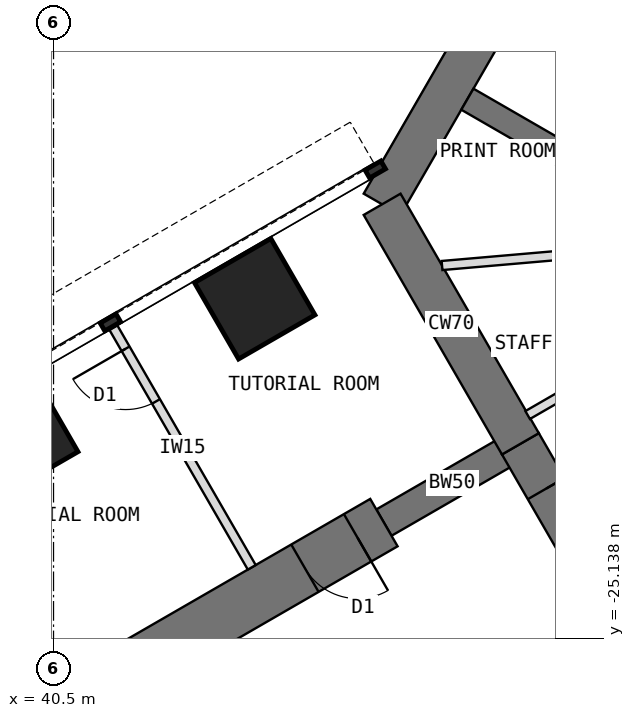
"""IFC4 building model, lengths in metres.
Left out: names, types, materials, properties, quantities, classifications, styles, units other than length and angle.
Written with IfcOpenShell. Run it as: python <this file> out.ifc"""

import sys

from ifc_helpers import new_model, si_unit, direction, frame, frame_2d, origin, origin_2d, place, context, subcontext, project, spatial, rectangle, extrude, element, fill, save


model = new_model("IFC4")
c1 = context("Model", 3, precision=1e-05, world=origin(), true_north=direction((0.0, 1.0)))
c2 = subcontext(c1, "Body", "Model", "MODEL_VIEW")
j1 = project(units=[si_unit("LENGTHUNIT", "METRE"), si_unit("PLANEANGLEUNIT", "RADIAN")], contexts=[c1])
p1 = place(None, origin())
s1 = spatial("IfcSite", under=j1, at=p1, CompositionType="ELEMENT")
p2 = place(p1, origin())
s2 = spatial("IfcBuilding", under=s1, at=p2, CompositionType="ELEMENT")
p3 = place(p2, frame((0.0, 0.0, 64.5)))
s3 = spatial("IfcBuildingStorey", under=s2, at=p3, CompositionType="ELEMENT", Elevation=64.5)
p4 = place(p3, frame((52.202, -7.092, 0.0), z_axis=(0.0, 0.0, 1.0), x_axis=(-0.500005998175, -0.866021940709, 0.0)))
e1 = element("IfcWall", 1, at=p4, inside=s3, PredefinedType="SHEAR", context=c2, shape_type="SweptSolid", body=[
    extrude(rectangle(XDim=12.596, YDim=0.7, at=frame_2d((6.298, 0.0))), origin(), (0.0, 0.0, 1.0), 4.0),
])
p5 = place(p3, frame((45.904, -18.0, 0.0), z_axis=(0.0, 0.0, 1.0), x_axis=(0.500024481964, -0.866011268655, 0.0)))
e2 = element("IfcWall", 2, at=p5, inside=s3, PredefinedType="SHEAR", context=c2, shape_type="SweptSolid", body=[
    extrude(rectangle(XDim=4.548, YDim=0.7, at=frame_2d((2.274, 0.0))), origin(), (0.0, 0.0, 1.0), 4.0),
])
p6 = place(p3, frame((48.178, -21.939, 0.0), z_axis=(0.0, 0.0, 1.0), x_axis=(0.500010275428, -0.866019471182, 0.0)))
e3 = element("IfcWall", 3, at=p6, inside=s3, PredefinedType="SHEAR", context=c2, shape_type="SweptSolid", body=[
    extrude(rectangle(XDim=3.5, YDim=0.7, at=frame_2d((1.75, 0.0))), origin(), (0.0, 0.0, 1.0), 4.0),
])
p7 = place(p6, frame((0.85, 0.0, 0.0)))
e4 = element("IfcOpeningElement", 4, at=p7, cuts=e3, PredefinedType="OPENING", context=c2, shape_type="SweptSolid", body=[
    extrude(rectangle(XDim=1.8, YDim=2.1, at=frame_2d((0.9, 1.05))), frame((0.0, 0.36, 0.0), z_axis=(0.0, -1.0, 0.0), x_axis=(1.0, 0.0, 0.0)), (0.0, 0.0, 1.0), 0.72),
])
for number, where, z_axis, x_axis in (
    (5, (49.928, -24.97, 0.0), (0.0, 0.0, 1.0), (-0.866, -0.5, 0.0)),
    (6, (48.178, -21.939, 0.0), (0.0, 0.0, 1.0), (-0.866, -0.5, 0.0)),
):
    element("IfcWall", number, at=place(p3, frame(where, z_axis=z_axis, x_axis=x_axis)), inside=s3, PredefinedType="SHEAR", context=c2, shape_type="SweptSolid", body=[
        extrude(rectangle(XDim=2.592, YDim=0.5, at=frame_2d((1.296, 0.0))), origin(), (0.0, 0.0, 1.0), 4.0),
    ])
p8 = place(p3, frame((45.934, -23.234, 0.0), z_axis=(0.0, 0.0, 1.0), x_axis=(-0.866019570528, -0.500010103361, 0.0)))
e7 = element("IfcWall", 7, at=p8, inside=s3, PredefinedType="SHEAR", context=c2, shape_type="SweptSolid", body=[
    extrude(rectangle(XDim=13.2, YDim=0.9, at=frame_2d((6.6, 0.0))), origin(), (0.0, 0.0, 1.0), 4.0),
])
p9 = place(p8, frame((0.5, 0.0, 0.0)))
e8 = element("IfcOpeningElement", 8, at=p9, cuts=e7, PredefinedType="OPENING", context=c2, shape_type="SweptSolid", body=[
    extrude(rectangle(XDim=1.0, YDim=2.1, at=frame_2d((0.5, 1.05))), frame((0.0, 0.46, 0.0), z_axis=(0.0, -1.0, 0.0), x_axis=(1.0, 0.0, 0.0)), (0.0, 0.0, 1.0), 0.92),
])
p10 = place(p8, frame((7.25, 0.0, 0.0)))
e9 = element("IfcOpeningElement", 9, at=p10, cuts=e7, PredefinedType="OPENING", context=c2, shape_type="SweptSolid", body=[
    extrude(rectangle(XDim=1.0, YDim=2.1, at=frame_2d((0.5, 1.05))), frame((0.0, 0.46, 0.0), z_axis=(0.0, -1.0, 0.0), x_axis=(1.0, 0.0, 0.0)), (0.0, 0.0, 1.0), 0.92),
])
for number, where, z_axis, x_axis in (
    (10, (43.809, -19.554, 0.0), (0.0, 0.0, 1.0), (0.866, 0.5, 0.0)),
    (11, (39.912, -21.804, 0.0), (0.0, 0.0, 1.0), (0.866, 0.5, 0.0)),
):
    element("IfcColumn", number, at=place(p3, frame(where, z_axis=z_axis, x_axis=x_axis)), inside=s3, PredefinedType="COLUMN", context=c2, shape_type="SweptSolid", body=[
        extrude(rectangle(XDim=1.45, YDim=1.45, at=origin_2d()), origin(), (0.0, 0.0, 1.0), 4.0),
    ])
p11 = place(p3, frame((52.38, -19.201, 0.0), z_axis=(0.0, 0.0, 1.0), x_axis=(-0.866023886965, 0.500002627198, 0.0)))
e12 = element("IfcWall", 12, at=p11, inside=s3, PredefinedType="SHEAR", context=c2, shape_type="SweptSolid", body=[
    extrude(rectangle(XDim=5.858, YDim=0.4, at=frame_2d((2.929, 0.0))), origin(), (0.0, 0.0, 1.0), 4.0),
])
p12 = place(p3, frame((43.76, -23.97, 0.0), z_axis=(0.0, 0.0, 1.0), x_axis=(-0.499982560684, 0.866035472144, 0.0)))
e13 = element("IfcWall", 13, at=p12, inside=s3, PredefinedType="PARTITIONING", context=c2, shape_type="SweptSolid", body=[
    extrude(rectangle(XDim=4.55, YDim=0.15, at=frame_2d((2.275, 0.0))), origin(), (0.0, 0.0, 1.0), 3.8),
])
p13 = place(p12, frame((3.15, 0.0, 0.0)))
e14 = element("IfcOpeningElement", 14, at=p13, cuts=e13, PredefinedType="OPENING", context=c2, shape_type="SweptSolid", body=[
    extrude(rectangle(XDim=1.0, YDim=2.1, at=frame_2d((0.5, 1.05))), frame((0.0, 0.085, 0.0), z_axis=(0.0, -1.0, 0.0), x_axis=(1.0, 0.0, 0.0)), (0.0, 0.0, 1.0), 0.17),
])
p14 = place(p3, frame((48.298, -21.466, 0.0), z_axis=(0.0, 0.0, 1.0), x_axis=(0.866021148949, 0.500007369519, 0.0)))
e15 = element("IfcWall", 15, at=p14, inside=s3, PredefinedType="PARTITIONING", context=c2, shape_type="SweptSolid", body=[
    extrude(rectangle(XDim=4.426, YDim=0.15, at=frame_2d((2.213, 0.0))), origin(), (0.0, 0.0, 1.0), 3.8),
])
p15 = place(p14, frame((2.598, 0.0, 0.0)))
e16 = element("IfcOpeningElement", 16, at=p15, cuts=e15, PredefinedType="OPENING", context=c2, shape_type="SweptSolid", body=[
    extrude(rectangle(XDim=1.0, YDim=2.1, at=frame_2d((0.5, 1.05))), frame((0.0, 0.085, 0.0), z_axis=(0.0, -1.0, 0.0), x_axis=(1.0, 0.0, 0.0)), (0.0, 0.0, 1.0), 0.17),
])
p16 = place(p3, frame((51.371, -18.618, 0.0), z_axis=(0.0, 0.0, 1.0), x_axis=(-0.996259708579, -0.086409450071, 0.0)))
e17 = element("IfcWall", 17, at=p16, inside=s3, PredefinedType="PARTITIONING", context=c2, shape_type="SweptSolid", body=[
    extrude(rectangle(XDim=4.498, YDim=0.15, at=frame_2d((2.249, 0.0))), origin(), (0.0, 0.0, 1.0), 3.8),
])
p17 = place(p16, frame((0.849, 0.0, 0.0)))
e18 = element("IfcOpeningElement", 18, at=p17, cuts=e17, PredefinedType="OPENING", context=c2, shape_type="SweptSolid", body=[
    extrude(rectangle(XDim=1.0, YDim=2.1, at=frame_2d((0.5, 1.05))), frame((0.0, 0.085, 0.0), z_axis=(0.0, -1.0, 0.0), x_axis=(1.0, 0.0, 0.0)), (0.0, 0.0, 1.0), 0.17),
])
p18 = place(p7, origin())
e19 = element("IfcDoor", 19, at=p18, inside=s3, OperationType="DOUBLE_DOOR_DOUBLE_SWING", PredefinedType="DOOR", context=c2, shape_type="SweptSolid", body=[
    extrude(rectangle(XDim=1.72, YDim=2.06, at=frame_2d((0.9, 1.03))), frame((0.0, 0.025, 0.0), z_axis=(0.0, -1.0, 0.0), x_axis=(1.0, 0.0, 0.0)), (0.0, 0.0, 1.0), 0.05),
    extrude(rectangle(XDim=0.04, YDim=2.1, at=frame_2d((0.02, 1.05))), frame((0.0, 0.35, 0.0), z_axis=(0.0, -1.0, 0.0), x_axis=(1.0, 0.0, 0.0)), (0.0, 0.0, 1.0), 0.699),
    extrude(rectangle(XDim=0.04, YDim=2.1, at=frame_2d((1.78, 1.05))), frame((0.0, 0.35, 0.0), z_axis=(0.0, -1.0, 0.0), x_axis=(1.0, 0.0, 0.0)), (0.0, 0.0, 1.0), 0.699),
    extrude(rectangle(XDim=1.72, YDim=0.04, at=frame_2d((0.9, 2.08))), frame((0.0, 0.35, 0.0), z_axis=(0.0, -1.0, 0.0), x_axis=(1.0, 0.0, 0.0)), (0.0, 0.0, 1.0), 0.699),
])
fill(e4, e19)
p19 = place(p13, origin())
e20 = element("IfcDoor", 20, at=p19, inside=s3, OperationType="SINGLE_SWING_RIGHT", PredefinedType="DOOR", context=c2, shape_type="SweptSolid", body=[
    extrude(rectangle(XDim=1.0, YDim=2.1, at=frame_2d((0.5, 1.05))), frame((0.0, 0.025, 0.0), z_axis=(0.0, -1.0, 0.0), x_axis=(1.0, 0.0, 0.0)), (0.0, 0.0, 1.0), 0.05),
])
fill(e14, e20)
p20 = place(p9, origin())
e21 = element("IfcDoor", 21, at=p20, inside=s3, OperationType="SINGLE_SWING_LEFT", PredefinedType="DOOR", context=c2, shape_type="SweptSolid", body=[
    extrude(rectangle(XDim=0.92, YDim=2.06, at=frame_2d((0.5, 1.03))), frame((0.0, 0.025, 0.0), z_axis=(0.0, -1.0, 0.0), x_axis=(1.0, 0.0, 0.0)), (0.0, 0.0, 1.0), 0.05),
    extrude(rectangle(XDim=0.04, YDim=2.1, at=frame_2d((0.02, 1.05))), frame((0.0, 0.45, 0.0), z_axis=(0.0, -1.0, 0.0), x_axis=(1.0, 0.0, 0.0)), (0.0, 0.0, 1.0), 0.899),
    extrude(rectangle(XDim=0.04, YDim=2.1, at=frame_2d((0.98, 1.05))), frame((0.0, 0.45, 0.0), z_axis=(0.0, -1.0, 0.0), x_axis=(1.0, 0.0, 0.0)), (0.0, 0.0, 1.0), 0.899),
    extrude(rectangle(XDim=0.92, YDim=0.04, at=frame_2d((0.5, 2.08))), frame((0.0, 0.45, 0.0), z_axis=(0.0, -1.0, 0.0), x_axis=(1.0, 0.0, 0.0)), (0.0, 0.0, 1.0), 0.899),
])
fill(e8, e21)
save(model, sys.argv[1])
